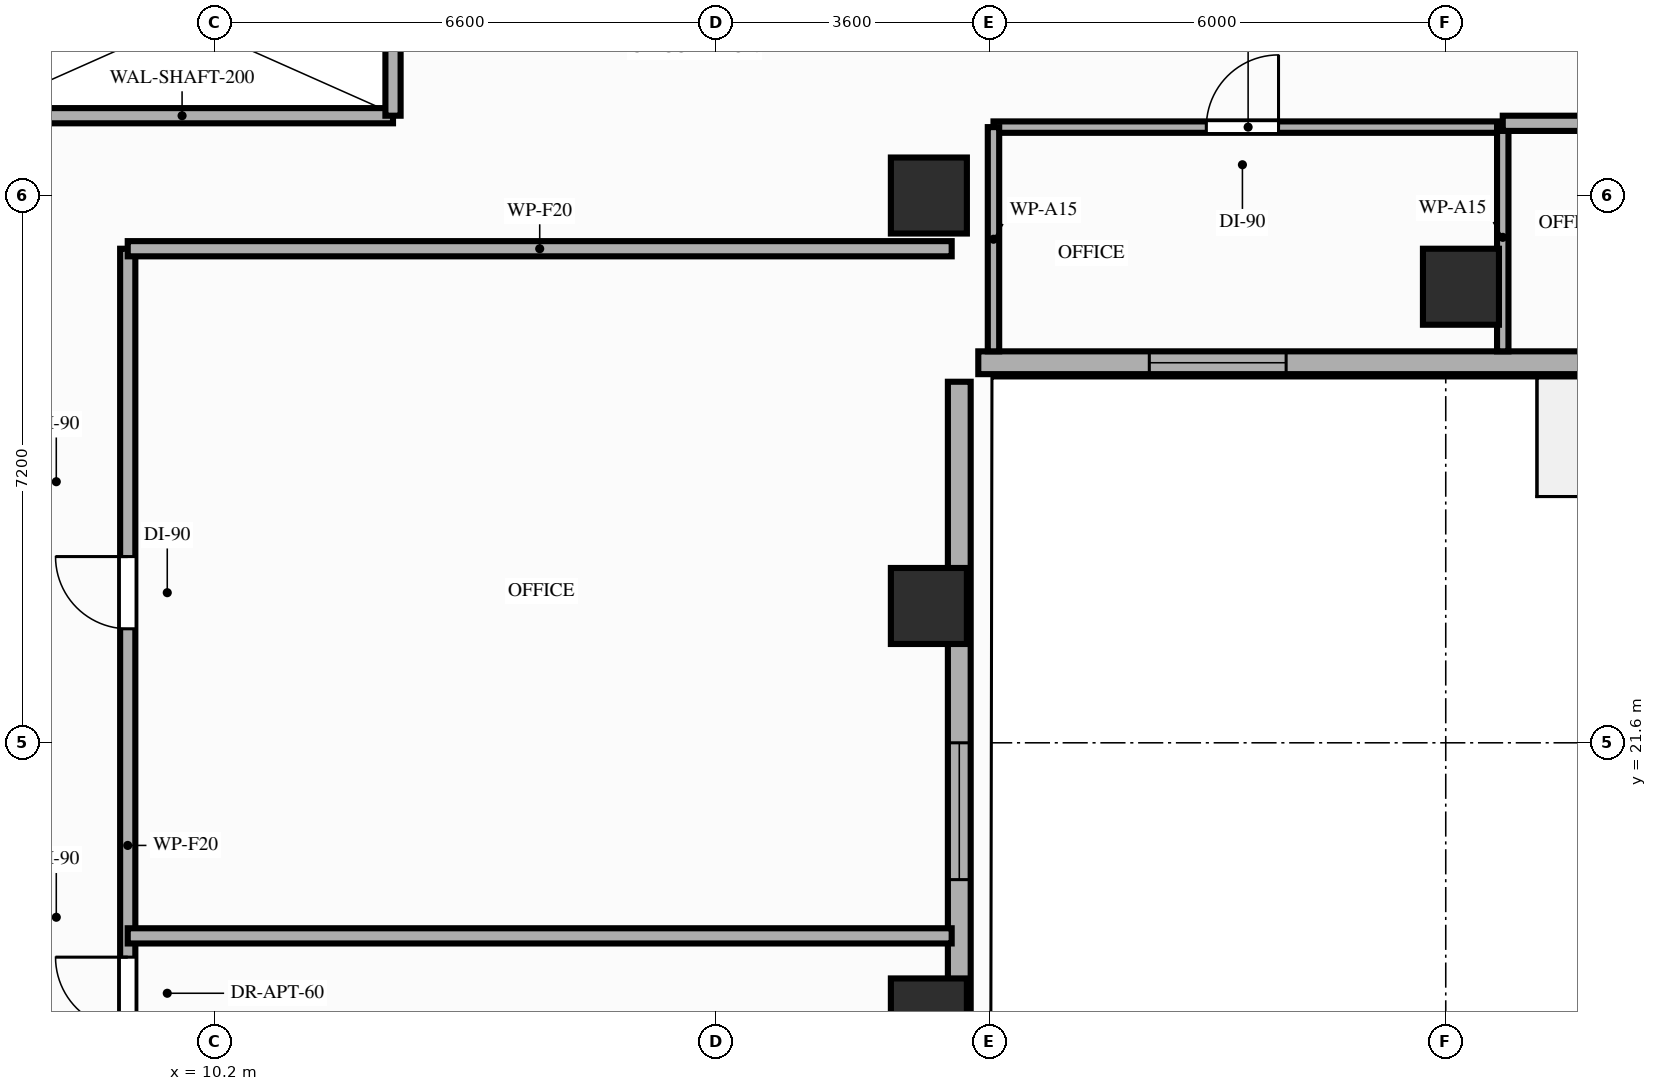
"""IFC4 building model, lengths in metres.
Left out: names, types, materials, properties, quantities, classifications, styles, units other than length and angle.
Written with IfcOpenShell. Run it as: python <this file> out.ifc"""

import sys

from ifc_helpers import new_model, si_unit, direction, frame, frame_2d, origin, origin_2d, place, context, subcontext, project, spatial, rectangle, extrude, element, fill, save


model = new_model("IFC4")
c1 = context("Model", 3, precision=1e-05, world=origin(), true_north=direction((0.0, 1.0)))
c2 = subcontext(c1, "Body", "Model", "MODEL_VIEW")
j1 = project(units=[si_unit("LENGTHUNIT", "METRE"), si_unit("PLANEANGLEUNIT", "RADIAN")], contexts=[c1])
p1 = place(None, origin())
s1 = spatial("IfcSite", under=j1, at=p1, CompositionType="ELEMENT")
p2 = place(p1, origin())
s2 = spatial("IfcBuilding", under=s1, at=p2, CompositionType="ELEMENT")
p3 = place(p2, frame((0.0, 0.0, 126.6)))
s3 = spatial("IfcBuildingStorey", under=s2, at=p3, CompositionType="ELEMENT", Elevation=126.6)
for number, where, z_axis, x_axis in (
    (1, (19.6, 18.0, 0.0), (0.0, 0.0, 1.0), (1.0, 0.0, 0.0)),
    (2, (19.6, 23.4, 0.0), (0.0, 0.0, 1.0), (1.0, 0.0, 0.0)),
    (3, (19.6, 28.8, 0.0), (0.0, 0.0, 1.0), (1.0, 0.0, 0.0)),
    (4, (26.6, 27.6, 0.0), (0.0, 0.0, 1.0), (1.0, 0.0, 0.0)),
):
    element("IfcColumn", number, at=place(p3, frame(where, z_axis=z_axis, x_axis=x_axis)), inside=s3, PredefinedType="COLUMN", context=c2, shape_type="SweptSolid", body=[
        extrude(rectangle(XDim=1.0, YDim=1.0, at=origin_2d()), origin(), (0.0, 0.0, 1.0), 3.2),
    ])
p4 = place(p3, frame((20.0, 8.8, 0.0), z_axis=(0.0, 0.0, 1.0), x_axis=(0.0, 1.0, 0.0)))
e5 = element("IfcWall", 5, at=p4, inside=s3, PredefinedType="STANDARD", context=c2, shape_type="SweptSolid", body=[
    extrude(rectangle(XDim=17.55, YDim=0.3, at=frame_2d((8.775, 0.0))), origin(), (0.0, 0.0, 1.0), 2.45),
])
p5 = place(p4, frame((7.22, 0.0, 0.85)))
e6 = element("IfcOpeningElement", 6, at=p5, cuts=e5, PredefinedType="OPENING", context=c2, shape_type="SweptSolid", body=[
    extrude(rectangle(XDim=1.1, YDim=1.35, at=frame_2d((0.55, 0.675))), frame((0.0, 0.16, 0.0), z_axis=(0.0, -1.0, 0.0), x_axis=(1.0, 0.0, 0.0)), (0.0, 0.0, 1.0), 0.32),
])
p6 = place(p4, frame((11.0, 0.0, 0.85)))
e7 = element("IfcOpeningElement", 7, at=p6, cuts=e5, PredefinedType="OPENING", context=c2, shape_type="SweptSolid", body=[
    extrude(rectangle(XDim=1.8, YDim=1.35, at=frame_2d((0.9, 0.675))), frame((0.0, 0.16, 0.0), z_axis=(0.0, -1.0, 0.0), x_axis=(1.0, 0.0, 0.0)), (0.0, 0.0, 1.0), 0.32),
])
p7 = place(p3, frame((20.25, 26.6, 0.0), z_axis=(0.0, 0.0, 1.0), x_axis=(1.0, 0.0, 0.0)))
e8 = element("IfcWall", 8, at=p7, inside=s3, PredefinedType="STANDARD", context=c2, shape_type="SweptSolid", body=[
    extrude(rectangle(XDim=26.15, YDim=0.3, at=frame_2d((13.075, 0.0))), origin(), (0.0, 0.0, 1.0), 2.71),
])
p8 = place(p7, frame((7.95, 0.0, 0.0)))
e9 = element("IfcOpeningElement", 9, at=p8, cuts=e8, PredefinedType="OPENING", context=c2, shape_type="SweptSolid", body=[
    extrude(rectangle(XDim=1.4, YDim=2.1, at=frame_2d((0.7, 1.05))), frame((0.0, 0.16, 0.0), z_axis=(0.0, -1.0, 0.0), x_axis=(1.0, 0.0, 0.0)), (0.0, 0.0, 1.0), 0.32),
])
p9 = place(p7, frame((22.45, 0.0, 0.0)))
e10 = element("IfcOpeningElement", 10, at=p9, cuts=e8, PredefinedType="OPENING", context=c2, shape_type="SweptSolid", body=[
    extrude(rectangle(XDim=1.4, YDim=2.1, at=frame_2d((0.7, 1.05))), frame((0.0, 0.16, 0.0), z_axis=(0.0, -1.0, 0.0), x_axis=(1.0, 0.0, 0.0)), (0.0, 0.0, 1.0), 0.32),
])
p10 = place(p7, frame((2.25, 0.0, 0.85)))
e11 = element("IfcOpeningElement", 11, at=p10, cuts=e8, PredefinedType="OPENING", context=c2, shape_type="SweptSolid", body=[
    extrude(rectangle(XDim=1.8, YDim=1.61, at=frame_2d((0.9, 0.805))), frame((0.0, 0.16, 0.0), z_axis=(0.0, -1.0, 0.0), x_axis=(1.0, 0.0, 0.0)), (0.0, 0.0, 1.0), 0.32),
])
p11 = place(p7, frame((13.65, 0.0, 0.85)))
e12 = element("IfcOpeningElement", 12, at=p11, cuts=e8, PredefinedType="OPENING", context=c2, shape_type="SweptSolid", body=[
    extrude(rectangle(XDim=1.8, YDim=1.61, at=frame_2d((0.9, 0.805))), frame((0.0, 0.16, 0.0), z_axis=(0.0, -1.0, 0.0), x_axis=(1.0, 0.0, 0.0)), (0.0, 0.0, 1.0), 0.32),
])
p12 = place(p3, frame((7.0, 29.85, 0.0), z_axis=(0.0, 0.0, 1.0), x_axis=(1.0, 0.0, 0.0)))
e13 = element("IfcWall", 13, at=p12, inside=s3, PredefinedType="MOVABLE", context=c2, shape_type="SweptSolid", body=[
    extrude(rectangle(XDim=5.55, YDim=0.2, at=frame_2d((2.775, 0.0))), origin(), (0.0, 0.0, 1.0), 3.02),
])
p13 = place(p3, frame((12.55, 29.85, 0.0), z_axis=(0.0, 0.0, 1.0), x_axis=(0.0, 1.0, 0.0)))
e14 = element("IfcWall", 14, at=p13, inside=s3, PredefinedType="MOVABLE", context=c2, shape_type="SweptSolid", body=[
    extrude(rectangle(XDim=2.5, YDim=0.2, at=frame_2d((1.25, 0.0))), origin(), (0.0, 0.0, 1.0), 3.02),
])
p14 = place(p3, frame((9.06, 12.4, 0.0), z_axis=(0.0, 0.0, 1.0), x_axis=(0.0, 1.0, 0.0)))
e15 = element("IfcWall", 15, at=p14, inside=s3, PredefinedType="PARTITIONING", context=c2, shape_type="SweptSolid", body=[
    extrude(rectangle(XDim=15.7, YDim=0.2, at=frame_2d((7.85, 0.0))), origin(), (0.0, 0.0, 1.0), 2.45),
])
p15 = place(p14, frame((0.45, 0.0, 0.0)))
e16 = element("IfcOpeningElement", 16, at=p15, cuts=e15, PredefinedType="OPENING", context=c2, shape_type="SweptSolid", body=[
    extrude(rectangle(XDim=0.95, YDim=2.15, at=frame_2d((0.475, 1.075))), frame((0.0, 0.11, 0.0), z_axis=(0.0, -1.0, 0.0), x_axis=(1.0, 0.0, 0.0)), (0.0, 0.0, 1.0), 0.22),
])
p16 = place(p14, frame((2.08, 0.0, 0.0)))
e17 = element("IfcOpeningElement", 17, at=p16, cuts=e15, PredefinedType="OPENING", context=c2, shape_type="SweptSolid", body=[
    extrude(rectangle(XDim=0.95, YDim=2.1, at=frame_2d((0.475, 1.05))), frame((0.0, 0.11, 0.0), z_axis=(0.0, -1.0, 0.0), x_axis=(1.0, 0.0, 0.0)), (0.0, 0.0, 1.0), 0.22),
])
p17 = place(p14, frame((10.7, 0.0, 0.0)))
e18 = element("IfcOpeningElement", 18, at=p17, cuts=e15, PredefinedType="OPENING", context=c2, shape_type="SweptSolid", body=[
    extrude(rectangle(XDim=0.95, YDim=2.15, at=frame_2d((0.475, 1.075))), frame((0.0, 0.11, 0.0), z_axis=(0.0, -1.0, 0.0), x_axis=(1.0, 0.0, 0.0)), (0.0, 0.0, 1.0), 0.22),
])
p18 = place(p14, frame((5.43, 0.0, 0.0)))
e19 = element("IfcOpeningElement", 19, at=p18, cuts=e15, PredefinedType="OPENING", context=c2, shape_type="SweptSolid", body=[
    extrude(rectangle(XDim=0.95, YDim=2.15, at=frame_2d((0.475, 1.075))), frame((0.0, 0.11, 0.0), z_axis=(0.0, -1.0, 0.0), x_axis=(1.0, 0.0, 0.0)), (0.0, 0.0, 1.0), 0.22),
])
p19 = place(p3, frame((9.06, 28.1, 0.0), z_axis=(0.0, 0.0, 1.0), x_axis=(1.0, 0.0, 0.0)))
e20 = element("IfcWall", 20, at=p19, inside=s3, PredefinedType="PARTITIONING", context=c2, shape_type="SweptSolid", body=[
    extrude(rectangle(XDim=10.84, YDim=0.2, at=frame_2d((5.42, 0.0))), origin(), (0.0, 0.0, 1.0), 2.45),
])
p20 = place(p3, frame((20.45, 29.7, 0.0), z_axis=(0.0, 0.0, 1.0), x_axis=(1.0, 0.0, 0.0)))
e21 = element("IfcWall", 21, at=p20, inside=s3, PredefinedType="PARTITIONING", context=c2, shape_type="SweptSolid", body=[
    extrude(rectangle(XDim=6.7, YDim=0.15, at=frame_2d((3.35, 0.0))), origin(), (0.0, 0.0, 1.0), 3.02),
])
p21 = place(p20, frame((2.8, 0.0, 0.0)))
e22 = element("IfcOpeningElement", 22, at=p21, cuts=e21, PredefinedType="OPENING", context=c2, shape_type="SweptSolid", body=[
    extrude(rectangle(XDim=0.95, YDim=2.15, at=frame_2d((0.475, 1.075))), frame((0.0, 0.085, 0.0), z_axis=(0.0, -1.0, 0.0), x_axis=(1.0, 0.0, 0.0)), (0.0, 0.0, 1.0), 0.17),
])
p22 = place(p3, frame((20.45, 26.75, 0.0), z_axis=(0.0, 0.0, 1.0), x_axis=(0.0, 1.0, 0.0)))
e23 = element("IfcWall", 23, at=p22, inside=s3, PredefinedType="PARTITIONING", context=c2, shape_type="SweptSolid", body=[
    extrude(rectangle(XDim=2.95, YDim=0.15, at=frame_2d((1.475, 0.0))), origin(), (0.0, 0.0, 1.0), 2.45),
])
p23 = place(p3, frame((27.15, 26.75, 0.0), z_axis=(0.0, 0.0, 1.0), x_axis=(0.0, 1.0, 0.0)))
e24 = element("IfcWall", 24, at=p23, inside=s3, PredefinedType="PARTITIONING", context=c2, shape_type="SweptSolid", body=[
    extrude(rectangle(XDim=3.0, YDim=0.15, at=frame_2d((1.5, 0.0))), origin(), (0.0, 0.0, 1.0), 2.45),
])
p24 = place(p3, frame((9.06, 19.06, 0.0), z_axis=(0.0, 0.0, 1.0), x_axis=(1.0, 0.0, 0.0)))
e25 = element("IfcWall", 25, at=p24, inside=s3, PredefinedType="PARTITIONING", context=c2, shape_type="SweptSolid", body=[
    extrude(rectangle(XDim=10.84, YDim=0.2, at=frame_2d((5.42, 0.0))), origin(), (0.0, 0.0, 1.0), 2.45),
])
p25 = place(p3, frame((27.15, 29.75, 0.0), z_axis=(0.0, 0.0, 1.0), x_axis=(1.0, 0.0, 0.0)))
e26 = element("IfcWall", 26, at=p25, inside=s3, PredefinedType="PARTITIONING", context=c2, shape_type="SweptSolid", body=[
    extrude(rectangle(XDim=14.55, YDim=0.2, at=frame_2d((7.275, 0.0))), origin(), (0.0, 0.0, 1.0), 2.45),
])
p26 = place(p25, frame((2.21, 0.0, 0.0)))
e27 = element("IfcOpeningElement", 27, at=p26, cuts=e26, PredefinedType="OPENING", context=c2, shape_type="SweptSolid", body=[
    extrude(rectangle(XDim=0.95, YDim=2.15, at=frame_2d((0.475, 1.075))), frame((0.0, 0.11, 0.0), z_axis=(0.0, -1.0, 0.0), x_axis=(1.0, 0.0, 0.0)), (0.0, 0.0, 1.0), 0.22),
])
p27 = place(p25, frame((9.49, 0.0, 0.0)))
e28 = element("IfcOpeningElement", 28, at=p27, cuts=e26, PredefinedType="OPENING", context=c2, shape_type="SweptSolid", body=[
    extrude(rectangle(XDim=0.95, YDim=2.15, at=frame_2d((0.475, 1.075))), frame((0.0, 0.11, 0.0), z_axis=(0.0, -1.0, 0.0), x_axis=(1.0, 0.0, 0.0)), (0.0, 0.0, 1.0), 0.22),
])
p28 = place(p6, origin())
e29 = element("IfcWindow", 29, at=p28, inside=s3, PartitioningType="SINGLE_PANEL", PredefinedType="WINDOW", context=c2, shape_type="SweptSolid", body=[
    extrude(rectangle(XDim=1.8, YDim=1.35, at=frame_2d((0.9, 0.675))), frame((0.0, 0.03, 0.0), z_axis=(0.0, -1.0, 0.0), x_axis=(1.0, 0.0, 0.0)), (0.0, 0.0, 1.0), 0.06),
])
fill(e7, e29)
p29 = place(p10, origin())
e30 = element("IfcWindow", 30, at=p29, inside=s3, PartitioningType="SINGLE_PANEL", PredefinedType="WINDOW", context=c2, shape_type="SweptSolid", body=[
    extrude(rectangle(XDim=1.8, YDim=1.61, at=frame_2d((0.9, 0.805))), frame((0.0, 0.03, 0.0), z_axis=(0.0, -1.0, 0.0), x_axis=(1.0, 0.0, 0.0)), (0.0, 0.0, 1.0), 0.06),
])
fill(e11, e30)
p30 = place(p21, origin())
e31 = element("IfcDoor", 31, at=p30, inside=s3, OperationType="SINGLE_SWING_RIGHT", PredefinedType="DOOR", context=c2, shape_type="SweptSolid", body=[
    extrude(rectangle(XDim=0.95, YDim=2.15, at=frame_2d((0.475, 1.075))), frame((0.0, 0.025, 0.0), z_axis=(0.0, -1.0, 0.0), x_axis=(1.0, 0.0, 0.0)), (0.0, 0.0, 1.0), 0.05),
])
fill(e22, e31)
p31 = place(p17, origin())
e32 = element("IfcDoor", 32, at=p31, inside=s3, OperationType="SINGLE_SWING_RIGHT", PredefinedType="DOOR", context=c2, shape_type="SweptSolid", body=[
    extrude(rectangle(XDim=0.95, YDim=2.15, at=frame_2d((0.475, 1.075))), frame((0.0, 0.025, 0.0), z_axis=(0.0, -1.0, 0.0), x_axis=(1.0, 0.0, 0.0)), (0.0, 0.0, 1.0), 0.05),
])
fill(e18, e32)
p32 = place(p18, origin())
e33 = element("IfcDoor", 33, at=p32, inside=s3, OperationType="SINGLE_SWING_RIGHT", PredefinedType="DOOR", context=c2, shape_type="SweptSolid", body=[
    extrude(rectangle(XDim=0.95, YDim=2.15, at=frame_2d((0.475, 1.075))), frame((0.0, 0.025, 0.0), z_axis=(0.0, -1.0, 0.0), x_axis=(1.0, 0.0, 0.0)), (0.0, 0.0, 1.0), 0.05),
])
fill(e19, e33)
save(model, sys.argv[1])
